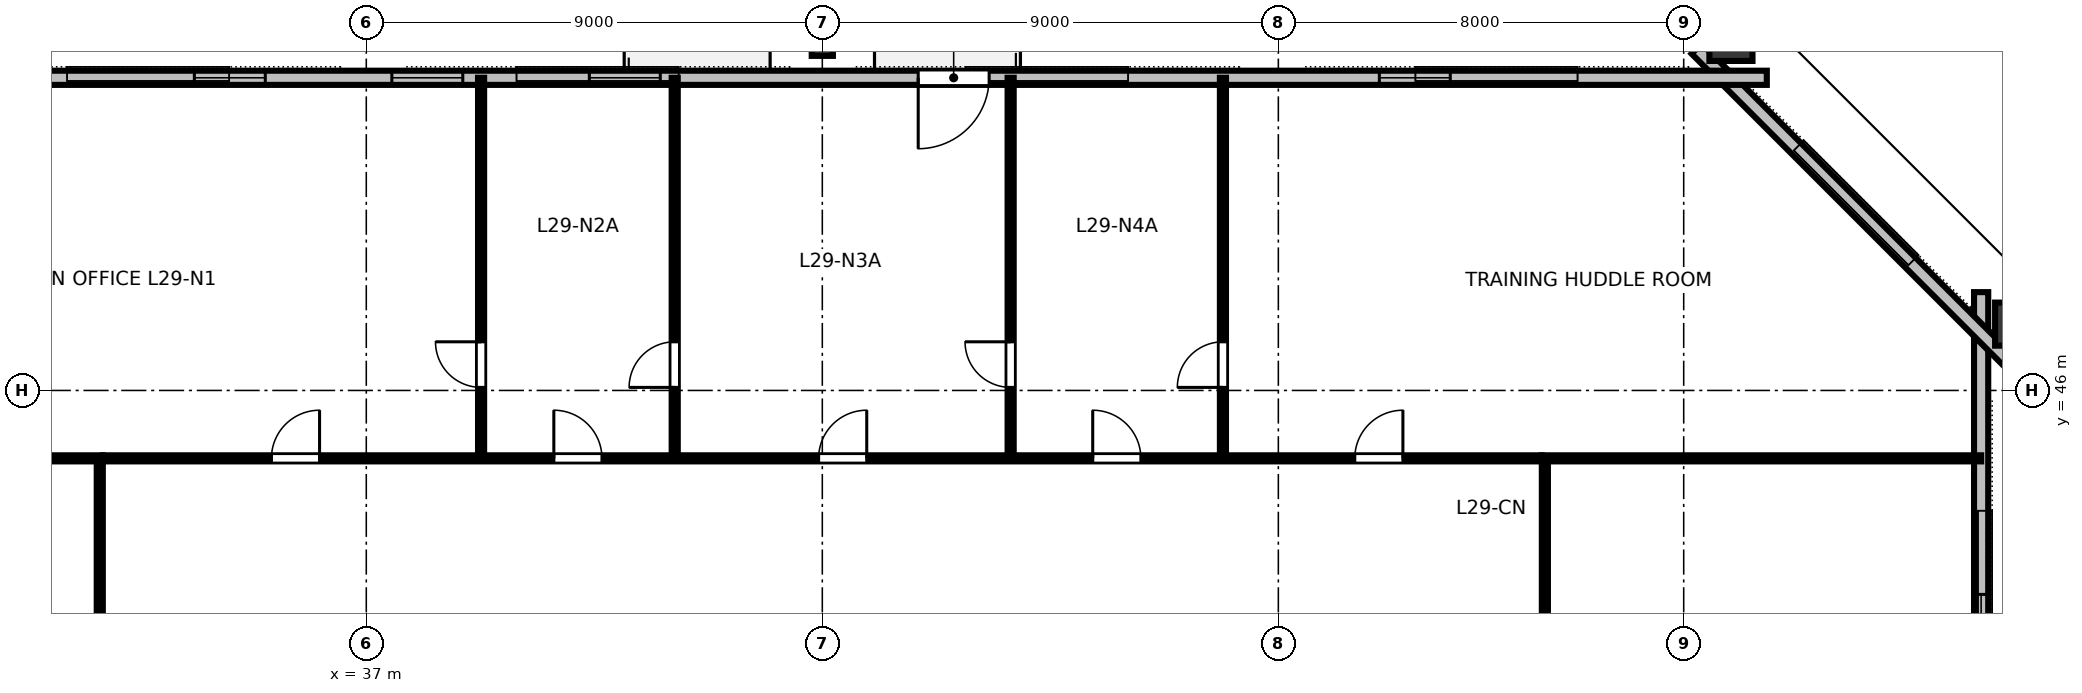
"""IFC4 building model, lengths in metres.
Left out: names, types, materials, properties, quantities, classifications, styles, units other than length and angle.
Written with IfcOpenShell. Run it as: python <this file> out.ifc"""

import sys

from ifc_helpers import new_model, si_unit, direction, frame, frame_2d, origin, origin_2d, place, context, subcontext, project, spatial, rectangle, hollow_rectangle, i_section, extrude, element, fill, save


model = new_model("IFC4")
c1 = context("Model", 3, precision=1e-05, world=origin(), true_north=direction((0.0, 1.0)))
c2 = subcontext(c1, "Body", "Model", "MODEL_VIEW")
j1 = project(units=[si_unit("LENGTHUNIT", "METRE"), si_unit("PLANEANGLEUNIT", "RADIAN")], contexts=[c1])
p1 = place(None, origin())
s1 = spatial("IfcSite", under=j1, at=p1, CompositionType="ELEMENT")
p2 = place(p1, origin())
s2 = spatial("IfcBuilding", under=s1, at=p2, CompositionType="ELEMENT")
p3 = place(p2, frame((0.0, 0.0, 113.2)))
s3 = spatial("IfcBuildingStorey", under=s2, at=p3, CompositionType="ELEMENT", Elevation=113.2)
p4 = place(p3, frame((69.646, 47.309, 0.0), z_axis=(-0.187078780285, -0.199037835024, 0.961969578623), x_axis=(0.658831210424, 0.700947149483, 0.273156603076)))
e1 = element("IfcColumn", 1, at=p4, inside=s3, PredefinedType="COLUMN", context=c2, shape_type="SweptSolid", body=[
    extrude(hollow_rectangle(XDim=0.85, YDim=1.0, WallThickness=0.05, at=origin_2d()), origin(), (0.0, 0.0, 1.0), 3.491),
])
p5 = place(p3, frame((63.933, 53.002, 0.0), z_axis=(-0.227500403072, -0.158558770333, 0.960782328601), x_axis=(0.571787524267, -0.820401747373, 0.0)))
e2 = element("IfcColumn", 2, at=p5, inside=s3, PredefinedType="COLUMN", context=c2, shape_type="SweptSolid", body=[
    extrude(hollow_rectangle(XDim=0.85, YDim=1.0, WallThickness=0.05, at=origin_2d()), origin(), (0.0, 0.0, 1.0), 3.495),
])
p6 = place(p3, frame((46.0, 52.83, 0.0), z_axis=(0.0, -0.161641018094, 0.986849624446), x_axis=(1.0, 0.0, 0.0)))
e3 = element("IfcColumn", 3, at=p6, inside=s3, PredefinedType="COLUMN", context=c2, shape_type="SweptSolid", body=[
    extrude(i_section(OverallWidth=0.418, OverallDepth=0.455, WebThickness=0.042, FlangeThickness=0.068, FilletRadius=0.025, at=origin_2d()), origin(), (0.0, 0.0, 1.0), 3.403),
])
p7 = place(p3, frame((68.87, 16.06, 0.0), z_axis=(0.0, 0.0, 1.0), x_axis=(0.0, 1.0, 0.0)))
e4 = element("IfcWall", 4, at=p7, inside=s3, PredefinedType="STANDARD", context=c2, shape_type="SweptSolid", body=[
    extrude(rectangle(XDim=31.88, YDim=0.28, at=frame_2d((15.94, 0.0))), origin(), (0.0, 0.0, 1.0), 2.662),
])
p8 = place(p7, frame((5.965, 0.0, 0.85)))
e5 = element("IfcOpeningElement", 5, at=p8, cuts=e4, PredefinedType="OPENING", context=c2, shape_type="SweptSolid", body=[
    extrude(rectangle(XDim=1.4, YDim=1.2, at=frame_2d((0.7, 0.6))), frame((0.0, 0.15, 0.0), z_axis=(0.0, -1.0, 0.0), x_axis=(1.0, 0.0, 0.0)), (0.0, 0.0, 1.0), 0.3),
])
p9 = place(p7, frame((9.675, 0.0, 0.85)))
e6 = element("IfcOpeningElement", 6, at=p9, cuts=e4, PredefinedType="OPENING", context=c2, shape_type="SweptSolid", body=[
    extrude(rectangle(XDim=1.4, YDim=1.2, at=frame_2d((0.7, 0.6))), frame((0.0, 0.15, 0.0), z_axis=(0.0, -1.0, 0.0), x_axis=(1.0, 0.0, 0.0)), (0.0, 0.0, 1.0), 0.3),
])
p10 = place(p7, frame((13.385, 0.0, 0.85)))
e7 = element("IfcOpeningElement", 7, at=p10, cuts=e4, PredefinedType="OPENING", context=c2, shape_type="SweptSolid", body=[
    extrude(rectangle(XDim=1.4, YDim=1.2, at=frame_2d((0.7, 0.6))), frame((0.0, 0.15, 0.0), z_axis=(0.0, -1.0, 0.0), x_axis=(1.0, 0.0, 0.0)), (0.0, 0.0, 1.0), 0.3),
])
p11 = place(p7, frame((20.805, 0.0, 0.85)))
e8 = element("IfcOpeningElement", 8, at=p11, cuts=e4, PredefinedType="OPENING", context=c2, shape_type="SweptSolid", body=[
    extrude(rectangle(XDim=1.4, YDim=1.2, at=frame_2d((0.7, 0.6))), frame((0.0, 0.15, 0.0), z_axis=(0.0, -1.0, 0.0), x_axis=(1.0, 0.0, 0.0)), (0.0, 0.0, 1.0), 0.3),
])
p12 = place(p7, frame((24.515, 0.0, 0.85)))
e9 = element("IfcOpeningElement", 9, at=p12, cuts=e4, PredefinedType="OPENING", context=c2, shape_type="SweptSolid", body=[
    extrude(rectangle(XDim=1.4, YDim=1.2, at=frame_2d((0.7, 0.6))), frame((0.0, 0.15, 0.0), z_axis=(0.0, -1.0, 0.0), x_axis=(1.0, 0.0, 0.0)), (0.0, 0.0, 1.0), 0.3),
])
p13 = place(p3, frame((69.444, 46.554, 0.0), z_axis=(0.0, 0.0, 1.0), x_axis=(-0.707106781187, 0.707106781187, 0.0)))
e10 = element("IfcWall", 10, at=p13, inside=s3, PredefinedType="STANDARD", context=c2, shape_type="SweptSolid", body=[
    extrude(rectangle(XDim=8.753, YDim=0.28, at=frame_2d((4.376, 0.0))), origin(), (0.0, 0.0, 1.0), 2.662),
])
p14 = place(p3, frame((64.64, 52.17, 0.0), z_axis=(0.0, 0.0, 1.0), x_axis=(-1.0, 0.0, 0.0)))
e11 = element("IfcWall", 11, at=p14, inside=s3, PredefinedType="STANDARD", context=c2, shape_type="SweptSolid", body=[
    extrude(rectangle(XDim=37.28, YDim=0.28, at=frame_2d((18.64, 0.0))), origin(), (0.0, 0.0, 1.0), 2.662),
])
p15 = place(p14, frame((15.347, 0.0, 0.0)))
e12 = element("IfcOpeningElement", 12, at=p15, cuts=e11, PredefinedType="OPENING", context=c2, shape_type="SweptSolid", body=[
    extrude(rectangle(XDim=1.4, YDim=2.15, at=frame_2d((0.7, 1.075))), frame((0.0, 0.15, 0.0), z_axis=(0.0, -1.0, 0.0), x_axis=(1.0, 0.0, 0.0)), (0.0, 0.0, 1.0), 0.3),
])
p16 = place(p14, frame((6.247, 0.0, 0.85)))
e13 = element("IfcOpeningElement", 13, at=p16, cuts=e11, PredefinedType="OPENING", context=c2, shape_type="SweptSolid", body=[
    extrude(rectangle(XDim=1.4, YDim=1.2, at=frame_2d((0.7, 0.6))), frame((0.0, 0.15, 0.0), z_axis=(0.0, -1.0, 0.0), x_axis=(1.0, 0.0, 0.0)), (0.0, 0.0, 1.0), 0.3),
])
p17 = place(p14, frame((21.838, 0.0, 0.85)))
e14 = element("IfcOpeningElement", 14, at=p17, cuts=e11, PredefinedType="OPENING", context=c2, shape_type="SweptSolid", body=[
    extrude(rectangle(XDim=1.4, YDim=1.2, at=frame_2d((0.7, 0.6))), frame((0.0, 0.15, 0.0), z_axis=(0.0, -1.0, 0.0), x_axis=(1.0, 0.0, 0.0)), (0.0, 0.0, 1.0), 0.3),
])
p18 = place(p14, frame((25.736, 0.0, 0.85)))
e15 = element("IfcOpeningElement", 15, at=p18, cuts=e11, PredefinedType="OPENING", context=c2, shape_type="SweptSolid", body=[
    extrude(rectangle(XDim=1.4, YDim=1.2, at=frame_2d((0.7, 0.6))), frame((0.0, 0.15, 0.0), z_axis=(0.0, -1.0, 0.0), x_axis=(1.0, 0.0, 0.0)), (0.0, 0.0, 1.0), 0.3),
])
p19 = place(p14, frame((29.633, 0.0, 0.85)))
e16 = element("IfcOpeningElement", 16, at=p19, cuts=e11, PredefinedType="OPENING", context=c2, shape_type="SweptSolid", body=[
    extrude(rectangle(XDim=1.4, YDim=1.2, at=frame_2d((0.7, 0.6))), frame((0.0, 0.15, 0.0), z_axis=(0.0, -1.0, 0.0), x_axis=(1.0, 0.0, 0.0)), (0.0, 0.0, 1.0), 0.3),
])
p20 = place(p3, frame((39.266, 44.66, 0.0), z_axis=(0.0, 0.0, 1.0), x_axis=(0.0, 1.0, 0.0)))
e17 = element("IfcWall", 17, at=p20, inside=s3, PredefinedType="PARTITIONING", context=c2, shape_type="SweptSolid", body=[
    extrude(rectangle(XDim=7.51, YDim=0.12, at=frame_2d((3.755, 0.0))), origin(), (0.0, 0.0, 1.0), 2.64),
])
p21 = place(p20, frame((1.4, 0.0, 0.0)))
e18 = element("IfcOpeningElement", 18, at=p21, cuts=e17, PredefinedType="OPENING", context=c2, shape_type="SweptSolid", body=[
    extrude(rectangle(XDim=0.9, YDim=2.15, at=frame_2d((0.45, 1.075))), frame((0.0, 0.07, 0.0), z_axis=(0.0, -1.0, 0.0), x_axis=(1.0, 0.0, 0.0)), (0.0, 0.0, 1.0), 0.14),
])
p22 = place(p3, frame((43.087, 44.66, 0.0), z_axis=(0.0, 0.0, 1.0), x_axis=(0.0, 1.0, 0.0)))
e19 = element("IfcWall", 19, at=p22, inside=s3, PredefinedType="PARTITIONING", context=c2, shape_type="SweptSolid", body=[
    extrude(rectangle(XDim=7.51, YDim=0.12, at=frame_2d((3.755, 0.0))), origin(), (0.0, 0.0, 1.0), 2.64),
])
p23 = place(p22, frame((1.4, 0.0, 0.0)))
e20 = element("IfcOpeningElement", 20, at=p23, cuts=e19, PredefinedType="OPENING", context=c2, shape_type="SweptSolid", body=[
    extrude(rectangle(XDim=0.9, YDim=2.15, at=frame_2d((0.45, 1.075))), frame((0.0, 0.07, 0.0), z_axis=(0.0, -1.0, 0.0), x_axis=(1.0, 0.0, 0.0)), (0.0, 0.0, 1.0), 0.14),
])
p24 = place(p3, frame((49.717, 44.66, 0.0), z_axis=(0.0, 0.0, 1.0), x_axis=(0.0, 1.0, 0.0)))
e21 = element("IfcWall", 21, at=p24, inside=s3, PredefinedType="PARTITIONING", context=c2, shape_type="SweptSolid", body=[
    extrude(rectangle(XDim=7.51, YDim=0.12, at=frame_2d((3.755, 0.0))), origin(), (0.0, 0.0, 1.0), 2.64),
])
p25 = place(p24, frame((1.4, 0.0, 0.0)))
e22 = element("IfcOpeningElement", 22, at=p25, cuts=e21, PredefinedType="OPENING", context=c2, shape_type="SweptSolid", body=[
    extrude(rectangle(XDim=0.9, YDim=2.15, at=frame_2d((0.45, 1.075))), frame((0.0, 0.07, 0.0), z_axis=(0.0, -1.0, 0.0), x_axis=(1.0, 0.0, 0.0)), (0.0, 0.0, 1.0), 0.14),
])
p26 = place(p3, frame((53.906, 44.66, 0.0), z_axis=(0.0, 0.0, 1.0), x_axis=(0.0, 1.0, 0.0)))
e23 = element("IfcWall", 23, at=p26, inside=s3, PredefinedType="PARTITIONING", context=c2, shape_type="SweptSolid", body=[
    extrude(rectangle(XDim=7.51, YDim=0.12, at=frame_2d((3.755, 0.0))), origin(), (0.0, 0.0, 1.0), 2.64),
])
p27 = place(p26, frame((1.4, 0.0, 0.0)))
e24 = element("IfcOpeningElement", 24, at=p27, cuts=e23, PredefinedType="OPENING", context=c2, shape_type="SweptSolid", body=[
    extrude(rectangle(XDim=0.9, YDim=2.15, at=frame_2d((0.45, 1.075))), frame((0.0, 0.07, 0.0), z_axis=(0.0, -1.0, 0.0), x_axis=(1.0, 0.0, 0.0)), (0.0, 0.0, 1.0), 0.14),
])
p28 = place(p3, frame((31.8, 44.66, 0.0), z_axis=(0.0, 0.0, 1.0), x_axis=(1.0, 0.0, 0.0)))
e25 = element("IfcWall", 25, at=p28, inside=s3, PredefinedType="PARTITIONING", context=c2, shape_type="SweptSolid", body=[
    extrude(rectangle(XDim=28.4, YDim=0.12, at=frame_2d((14.2, 0.0))), origin(), (0.0, 0.0, 1.0), 2.64),
])
p29 = place(p28, frame((3.328, 0.0, 0.0)))
e26 = element("IfcOpeningElement", 26, at=p29, cuts=e25, PredefinedType="OPENING", context=c2, shape_type="SweptSolid", body=[
    extrude(rectangle(XDim=0.95, YDim=2.15, at=frame_2d((0.475, 1.075))), frame((0.0, 0.07, 0.0), z_axis=(0.0, -1.0, 0.0), x_axis=(1.0, 0.0, 0.0)), (0.0, 0.0, 1.0), 0.14),
])
p30 = place(p28, frame((8.901, 0.0, 0.0)))
e27 = element("IfcOpeningElement", 27, at=p30, cuts=e25, PredefinedType="OPENING", context=c2, shape_type="SweptSolid", body=[
    extrude(rectangle(XDim=0.95, YDim=2.15, at=frame_2d((0.475, 1.075))), frame((0.0, 0.07, 0.0), z_axis=(0.0, -1.0, 0.0), x_axis=(1.0, 0.0, 0.0)), (0.0, 0.0, 1.0), 0.14),
])
p31 = place(p28, frame((14.127, 0.0, 0.0)))
e28 = element("IfcOpeningElement", 28, at=p31, cuts=e25, PredefinedType="OPENING", context=c2, shape_type="SweptSolid", body=[
    extrude(rectangle(XDim=0.95, YDim=2.15, at=frame_2d((0.475, 1.075))), frame((0.0, 0.07, 0.0), z_axis=(0.0, -1.0, 0.0), x_axis=(1.0, 0.0, 0.0)), (0.0, 0.0, 1.0), 0.14),
])
p32 = place(p28, frame((19.537, 0.0, 0.0)))
e29 = element("IfcOpeningElement", 29, at=p32, cuts=e25, PredefinedType="OPENING", context=c2, shape_type="SweptSolid", body=[
    extrude(rectangle(XDim=0.95, YDim=2.15, at=frame_2d((0.475, 1.075))), frame((0.0, 0.07, 0.0), z_axis=(0.0, -1.0, 0.0), x_axis=(1.0, 0.0, 0.0)), (0.0, 0.0, 1.0), 0.14),
])
p33 = place(p28, frame((24.708, 0.0, 0.0)))
e30 = element("IfcOpeningElement", 30, at=p33, cuts=e25, PredefinedType="OPENING", context=c2, shape_type="SweptSolid", body=[
    extrude(rectangle(XDim=0.95, YDim=2.15, at=frame_2d((0.475, 1.075))), frame((0.0, 0.07, 0.0), z_axis=(0.0, -1.0, 0.0), x_axis=(1.0, 0.0, 0.0)), (0.0, 0.0, 1.0), 0.14),
])
p34 = place(p3, frame((31.74, 33.02, 0.0), z_axis=(0.0, 0.0, 1.0), x_axis=(0.0, 1.0, 0.0)))
e31 = element("IfcWall", 31, at=p34, inside=s3, PredefinedType="PARTITIONING", context=c2, shape_type="SweptSolid", body=[
    extrude(rectangle(XDim=11.58, YDim=0.12, at=frame_2d((5.79, 0.0))), origin(), (0.0, 0.0, 1.0), 2.64),
])
p35 = place(p34, frame((5.215, 0.0, 0.0)))
e32 = element("IfcOpeningElement", 32, at=p35, cuts=e31, PredefinedType="OPENING", context=c2, shape_type="SweptSolid", body=[
    extrude(rectangle(XDim=0.95, YDim=2.15, at=frame_2d((0.475, 1.075))), frame((0.0, 0.07, 0.0), z_axis=(0.0, -1.0, 0.0), x_axis=(1.0, 0.0, 0.0)), (0.0, 0.0, 1.0), 0.14),
])
p36 = place(p3, frame((60.26, 33.02, 0.0), z_axis=(0.0, 0.0, 1.0), x_axis=(0.0, 1.0, 0.0)))
e33 = element("IfcWall", 33, at=p36, inside=s3, PredefinedType="PARTITIONING", context=c2, shape_type="SweptSolid", body=[
    extrude(rectangle(XDim=11.58, YDim=0.12, at=frame_2d((5.79, 0.0))), origin(), (0.0, 0.0, 1.0), 2.64),
])
p37 = place(p36, frame((5.337, 0.0, 0.0)))
e34 = element("IfcOpeningElement", 34, at=p37, cuts=e33, PredefinedType="OPENING", context=c2, shape_type="SweptSolid", body=[
    extrude(rectangle(XDim=0.95, YDim=2.15, at=frame_2d((0.475, 1.075))), frame((0.0, 0.07, 0.0), z_axis=(0.0, -1.0, 0.0), x_axis=(1.0, 0.0, 0.0)), (0.0, 0.0, 1.0), 0.14),
])
for number, where, z_axis, x_axis in (
    (35, (31.8, 44.66, 0.0), (0.0, 0.0, 1.0), (-1.0, 0.0, 0.0)),
    (36, (60.2, 44.66, 0.0), (0.0, 0.0, 1.0), (1.0, 0.0, 0.0)),
):
    element("IfcWall", number, at=place(p3, frame(where, z_axis=z_axis, x_axis=x_axis)), inside=s3, PredefinedType="PARTITIONING", context=c2, shape_type="SweptSolid", body=[
        extrude(rectangle(XDim=8.67, YDim=0.12, at=frame_2d((4.335, 0.0))), origin(), (0.0, 0.0, 1.0), 2.64),
    ])
p38 = place(p12, origin())
e37 = element("IfcWindow", 37, at=p38, inside=s3, PartitioningType="SINGLE_PANEL", PredefinedType="WINDOW", context=c2, shape_type="SweptSolid", body=[
    extrude(rectangle(XDim=1.4, YDim=1.2, at=frame_2d((0.7, 0.6))), frame((0.0, 0.03, 0.0), z_axis=(0.0, -1.0, 0.0), x_axis=(1.0, 0.0, 0.0)), (0.0, 0.0, 1.0), 0.06),
])
fill(e9, e37)
p39 = place(p15, origin())
e38 = element("IfcDoor", 38, at=p39, inside=s3, OperationType="SINGLE_SWING_RIGHT", PredefinedType="DOOR", context=c2, shape_type="SweptSolid", body=[
    extrude(rectangle(XDim=1.4, YDim=2.15, at=frame_2d((0.7, 1.075))), frame((0.0, 0.025, 0.0), z_axis=(0.0, -1.0, 0.0), x_axis=(1.0, 0.0, 0.0)), (0.0, 0.0, 1.0), 0.05),
])
fill(e12, e38)
p40 = place(p16, origin())
e39 = element("IfcWindow", 39, at=p40, inside=s3, PartitioningType="SINGLE_PANEL", PredefinedType="WINDOW", context=c2, shape_type="SweptSolid", body=[
    extrude(rectangle(XDim=1.4, YDim=1.2, at=frame_2d((0.7, 0.6))), frame((0.0, 0.03, 0.0), z_axis=(0.0, -1.0, 0.0), x_axis=(1.0, 0.0, 0.0)), (0.0, 0.0, 1.0), 0.06),
])
fill(e13, e39)
p41 = place(p17, origin())
e40 = element("IfcWindow", 40, at=p41, inside=s3, PartitioningType="SINGLE_PANEL", PredefinedType="WINDOW", context=c2, shape_type="SweptSolid", body=[
    extrude(rectangle(XDim=1.4, YDim=1.2, at=frame_2d((0.7, 0.6))), frame((0.0, 0.03, 0.0), z_axis=(0.0, -1.0, 0.0), x_axis=(1.0, 0.0, 0.0)), (0.0, 0.0, 1.0), 0.06),
])
fill(e14, e40)
p42 = place(p18, origin())
e41 = element("IfcWindow", 41, at=p42, inside=s3, PartitioningType="SINGLE_PANEL", PredefinedType="WINDOW", context=c2, shape_type="SweptSolid", body=[
    extrude(rectangle(XDim=1.4, YDim=1.2, at=frame_2d((0.7, 0.6))), frame((0.0, 0.03, 0.0), z_axis=(0.0, -1.0, 0.0), x_axis=(1.0, 0.0, 0.0)), (0.0, 0.0, 1.0), 0.06),
])
fill(e15, e41)
p43 = place(p19, origin())
e42 = element("IfcWindow", 42, at=p43, inside=s3, PartitioningType="SINGLE_PANEL", PredefinedType="WINDOW", context=c2, shape_type="SweptSolid", body=[
    extrude(rectangle(XDim=1.4, YDim=1.2, at=frame_2d((0.7, 0.6))), frame((0.0, 0.03, 0.0), z_axis=(0.0, -1.0, 0.0), x_axis=(1.0, 0.0, 0.0)), (0.0, 0.0, 1.0), 0.06),
])
fill(e16, e42)
p44 = place(p21, origin())
e43 = element("IfcDoor", 43, at=p44, inside=s3, OperationType="SINGLE_SWING_RIGHT", PredefinedType="DOOR", context=c2, shape_type="SweptSolid", body=[
    extrude(rectangle(XDim=0.9, YDim=2.15, at=frame_2d((0.45, 1.075))), frame((0.0, 0.025, 0.0), z_axis=(0.0, -1.0, 0.0), x_axis=(1.0, 0.0, 0.0)), (0.0, 0.0, 1.0), 0.05),
])
fill(e18, e43)
p45 = place(p23, origin())
e44 = element("IfcDoor", 44, at=p45, inside=s3, OperationType="SINGLE_SWING_LEFT", PredefinedType="DOOR", context=c2, shape_type="SweptSolid", body=[
    extrude(rectangle(XDim=0.9, YDim=2.15, at=frame_2d((0.45, 1.075))), frame((0.0, 0.025, 0.0), z_axis=(0.0, -1.0, 0.0), x_axis=(1.0, 0.0, 0.0)), (0.0, 0.0, 1.0), 0.05),
])
fill(e20, e44)
p46 = place(p25, origin())
e45 = element("IfcDoor", 45, at=p46, inside=s3, OperationType="SINGLE_SWING_RIGHT", PredefinedType="DOOR", context=c2, shape_type="SweptSolid", body=[
    extrude(rectangle(XDim=0.9, YDim=2.15, at=frame_2d((0.45, 1.075))), frame((0.0, 0.025, 0.0), z_axis=(0.0, -1.0, 0.0), x_axis=(1.0, 0.0, 0.0)), (0.0, 0.0, 1.0), 0.05),
])
fill(e22, e45)
p47 = place(p27, origin())
e46 = element("IfcDoor", 46, at=p47, inside=s3, OperationType="SINGLE_SWING_LEFT", PredefinedType="DOOR", context=c2, shape_type="SweptSolid", body=[
    extrude(rectangle(XDim=0.9, YDim=2.15, at=frame_2d((0.45, 1.075))), frame((0.0, 0.025, 0.0), z_axis=(0.0, -1.0, 0.0), x_axis=(1.0, 0.0, 0.0)), (0.0, 0.0, 1.0), 0.05),
])
fill(e24, e46)
p48 = place(p29, origin())
e47 = element("IfcDoor", 47, at=p48, inside=s3, OperationType="SINGLE_SWING_RIGHT", PredefinedType="DOOR", context=c2, shape_type="SweptSolid", body=[
    extrude(rectangle(XDim=0.95, YDim=2.15, at=frame_2d((0.475, 1.075))), frame((0.0, 0.025, 0.0), z_axis=(0.0, -1.0, 0.0), x_axis=(1.0, 0.0, 0.0)), (0.0, 0.0, 1.0), 0.05),
])
fill(e26, e47)
p49 = place(p30, origin())
e48 = element("IfcDoor", 48, at=p49, inside=s3, OperationType="SINGLE_SWING_LEFT", PredefinedType="DOOR", context=c2, shape_type="SweptSolid", body=[
    extrude(rectangle(XDim=0.95, YDim=2.15, at=frame_2d((0.475, 1.075))), frame((0.0, 0.025, 0.0), z_axis=(0.0, -1.0, 0.0), x_axis=(1.0, 0.0, 0.0)), (0.0, 0.0, 1.0), 0.05),
])
fill(e27, e48)
p50 = place(p31, origin())
e49 = element("IfcDoor", 49, at=p50, inside=s3, OperationType="SINGLE_SWING_RIGHT", PredefinedType="DOOR", context=c2, shape_type="SweptSolid", body=[
    extrude(rectangle(XDim=0.95, YDim=2.15, at=frame_2d((0.475, 1.075))), frame((0.0, 0.025, 0.0), z_axis=(0.0, -1.0, 0.0), x_axis=(1.0, 0.0, 0.0)), (0.0, 0.0, 1.0), 0.05),
])
fill(e28, e49)
p51 = place(p32, origin())
e50 = element("IfcDoor", 50, at=p51, inside=s3, OperationType="SINGLE_SWING_LEFT", PredefinedType="DOOR", context=c2, shape_type="SweptSolid", body=[
    extrude(rectangle(XDim=0.95, YDim=2.15, at=frame_2d((0.475, 1.075))), frame((0.0, 0.025, 0.0), z_axis=(0.0, -1.0, 0.0), x_axis=(1.0, 0.0, 0.0)), (0.0, 0.0, 1.0), 0.05),
])
fill(e29, e50)
p52 = place(p33, origin())
e51 = element("IfcDoor", 51, at=p52, inside=s3, OperationType="SINGLE_SWING_RIGHT", PredefinedType="DOOR", context=c2, shape_type="SweptSolid", body=[
    extrude(rectangle(XDim=0.95, YDim=2.15, at=frame_2d((0.475, 1.075))), frame((0.0, 0.025, 0.0), z_axis=(0.0, -1.0, 0.0), x_axis=(1.0, 0.0, 0.0)), (0.0, 0.0, 1.0), 0.05),
])
fill(e30, e51)
save(model, sys.argv[1])
